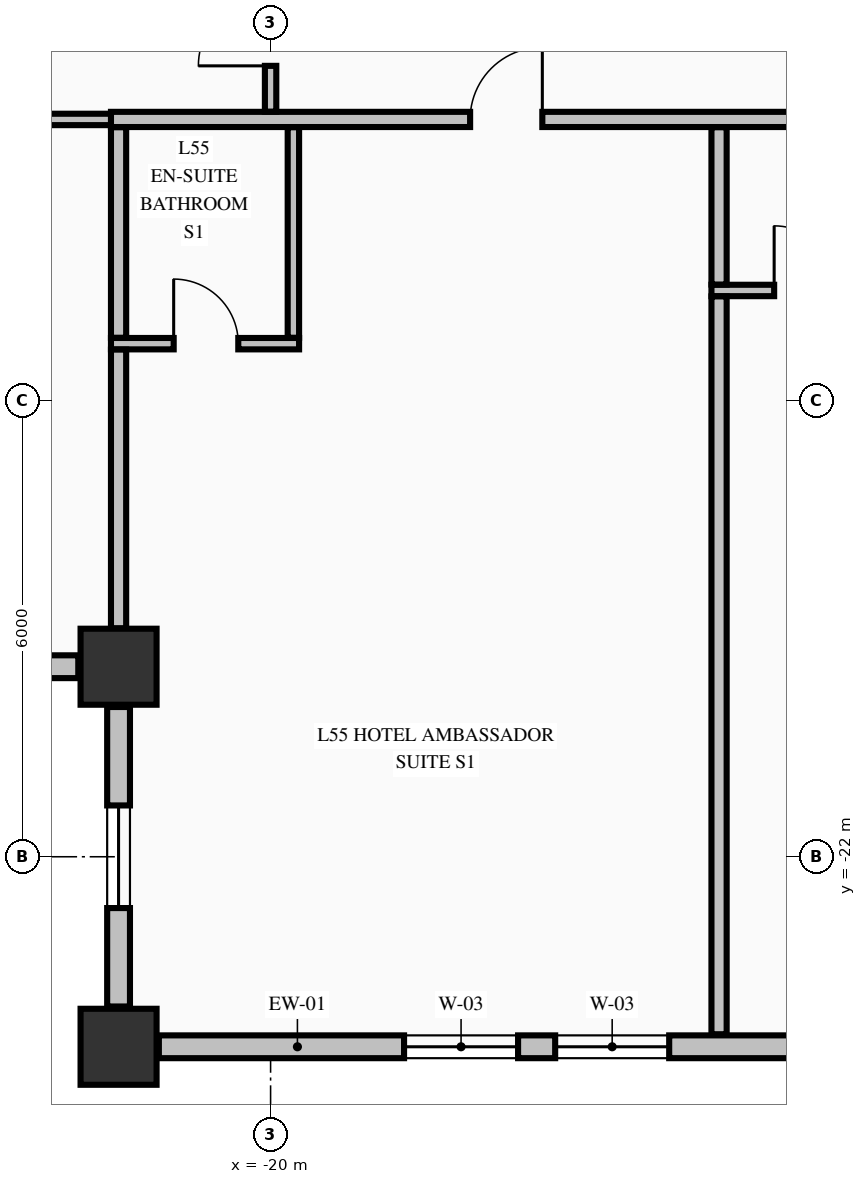
"""IFC4 building model, lengths in metres.
Left out: names, types, materials, properties, quantities, classifications, styles, units other than length and angle.
Written with IfcOpenShell. Run it as: python <this file> out.ifc"""

import sys

from ifc_helpers import new_model, si_unit, direction, frame, frame_2d, origin, origin_2d, place, context, subcontext, project, spatial, rectangle, extrude, element, fill, save


model = new_model("IFC4")
c1 = context("Model", 3, precision=1e-05, world=origin(), true_north=direction((0.0, 1.0)))
c2 = subcontext(c1, "Body", "Model", "MODEL_VIEW")
j1 = project(units=[si_unit("LENGTHUNIT", "METRE"), si_unit("PLANEANGLEUNIT", "RADIAN")], contexts=[c1])
p1 = place(None, origin())
s1 = spatial("IfcSite", under=j1, at=p1, CompositionType="ELEMENT")
p2 = place(p1, origin())
s2 = spatial("IfcBuilding", under=s1, at=p2, CompositionType="ELEMENT")
p3 = place(p2, frame((0.0, 0.0, 211.86)))
s3 = spatial("IfcBuildingStorey", under=s2, at=p3, CompositionType="ELEMENT", Elevation=211.86)
for number, where, z_axis, x_axis in (
    (1, (-22.0, -24.5, -0.325), (0.0, 0.0, 1.0), (1.0, 0.0, 0.0)),
    (2, (-22.0, -19.5, -0.325), (0.0, 0.0, 1.0), (1.0, 0.0, 0.0)),
):
    element("IfcColumn", number, at=place(p3, frame(where, z_axis=z_axis, x_axis=x_axis)), inside=s3, PredefinedType="COLUMN", context=c2, shape_type="SweptSolid", body=[
        extrude(rectangle(XDim=1.0, YDim=1.0, at=origin_2d()), origin(), (0.0, 0.0, 1.0), 3.475),
    ])
p4 = place(p3, frame((-26.47, -19.5, 0.0), z_axis=(0.0, 0.0, 1.0), x_axis=(1.0, 0.0, 0.0)))
e3 = element("IfcWall", 3, at=p4, inside=s3, PredefinedType="STANDARD", context=c2, shape_type="SweptSolid", body=[
    extrude(rectangle(XDim=3.94, YDim=0.3, at=frame_2d((1.97, 0.0))), origin(), (0.0, 0.0, 1.0), 2.542),
])
p5 = place(p4, frame((1.295, 0.0, 0.68)))
e4 = element("IfcOpeningElement", 4, at=p5, cuts=e3, PredefinedType="OPENING", context=c2, shape_type="SweptSolid", body=[
    extrude(rectangle(XDim=1.35, YDim=1.42, at=frame_2d((0.675, 0.71))), frame((0.0, 0.16, 0.0), z_axis=(0.0, -1.0, 0.0), x_axis=(1.0, 0.0, 0.0)), (0.0, 0.0, 1.0), 0.32),
])
p6 = place(p3, frame((-22.0, -20.03, 0.0), z_axis=(0.0, 0.0, 1.0), x_axis=(0.0, -1.0, 0.0)))
e5 = element("IfcWall", 5, at=p6, inside=s3, PredefinedType="STANDARD", context=c2, shape_type="SweptSolid", body=[
    extrude(rectangle(XDim=3.94, YDim=0.3, at=frame_2d((1.97, 0.0))), origin(), (0.0, 0.0, 1.0), 2.542),
])
p7 = place(p6, frame((1.295, 0.0, 0.68)))
e6 = element("IfcOpeningElement", 6, at=p7, cuts=e5, PredefinedType="OPENING", context=c2, shape_type="SweptSolid", body=[
    extrude(rectangle(XDim=1.35, YDim=1.42, at=frame_2d((0.675, 0.71))), frame((0.0, 0.16, 0.0), z_axis=(0.0, -1.0, 0.0), x_axis=(1.0, 0.0, 0.0)), (0.0, 0.0, 1.0), 0.32),
])
p8 = place(p3, frame((-21.47, -24.5, 0.0), z_axis=(0.0, 0.0, 1.0), x_axis=(1.0, 0.0, 0.0)))
e7 = element("IfcWall", 7, at=p8, inside=s3, PredefinedType="STANDARD", context=c2, shape_type="SweptSolid", body=[
    extrude(rectangle(XDim=9.94, YDim=0.3, at=frame_2d((4.97, 0.0))), origin(), (0.0, 0.0, 1.0), 2.542),
])
p9 = place(p8, frame((3.226, 0.0, 0.72)))
e8 = element("IfcOpeningElement", 8, at=p9, cuts=e7, PredefinedType="OPENING", context=c2, shape_type="SweptSolid", body=[
    extrude(rectangle(XDim=1.5, YDim=1.6, at=frame_2d((0.75, 0.8))), frame((0.0, 0.16, 0.0), z_axis=(0.0, -1.0, 0.0), x_axis=(1.0, 0.0, 0.0)), (0.0, 0.0, 1.0), 0.32),
])
p10 = place(p8, frame((5.214, 0.0, 0.72)))
e9 = element("IfcOpeningElement", 9, at=p10, cuts=e7, PredefinedType="OPENING", context=c2, shape_type="SweptSolid", body=[
    extrude(rectangle(XDim=1.5, YDim=1.6, at=frame_2d((0.75, 0.8))), frame((0.0, 0.16, 0.0), z_axis=(0.0, -1.0, 0.0), x_axis=(1.0, 0.0, 0.0)), (0.0, 0.0, 1.0), 0.32),
])
p11 = place(p3, frame((-22.1, -15.25, 0.0), z_axis=(0.0, 0.0, 1.0), x_axis=(1.0, 0.0, 0.0)))
e10 = element("IfcWall", 10, at=p11, inside=s3, PredefinedType="PARTITIONING", context=c2, shape_type="SweptSolid", body=[
    extrude(rectangle(XDim=2.475, YDim=0.15, at=frame_2d((1.238, 0.0))), origin(), (0.0, 0.0, 1.0), 3.15),
])
p12 = place(p11, frame((0.825, 0.0, 0.0)))
e11 = element("IfcOpeningElement", 11, at=p12, cuts=e10, PredefinedType="OPENING", context=c2, shape_type="SweptSolid", body=[
    extrude(rectangle(XDim=0.85, YDim=2.1, at=frame_2d((0.425, 1.05))), frame((0.0, 0.085, 0.0), z_axis=(0.0, -1.0, 0.0), x_axis=(1.0, 0.0, 0.0)), (0.0, 0.0, 1.0), 0.17),
])
p13 = place(p3, frame((-14.2, -14.55, 0.0), z_axis=(0.0, 0.0, 1.0), x_axis=(1.0, 0.0, 0.0)))
e12 = element("IfcWall", 12, at=p13, inside=s3, PredefinedType="PARTITIONING", context=c2, shape_type="SweptSolid", body=[
    extrude(rectangle(XDim=2.475, YDim=0.15, at=frame_2d((1.237, 0.0))), origin(), (0.0, 0.0, 1.0), 3.15),
])
p14 = place(p13, frame((0.825, 0.0, 0.0)))
e13 = element("IfcOpeningElement", 13, at=p14, cuts=e12, PredefinedType="OPENING", context=c2, shape_type="SweptSolid", body=[
    extrude(rectangle(XDim=0.85, YDim=2.1, at=frame_2d((0.425, 1.05))), frame((0.0, 0.085, 0.0), z_axis=(0.0, -1.0, 0.0), x_axis=(1.0, 0.0, 0.0)), (0.0, 0.0, 1.0), 0.17),
])
p15 = place(p3, frame((-26.835, -12.3, 0.0), z_axis=(0.0, 0.0, 1.0), x_axis=(1.0, 0.0, 0.0)))
e14 = element("IfcWall", 14, at=p15, inside=s3, PredefinedType="PARTITIONING", context=c2, shape_type="SweptSolid", body=[
    extrude(rectangle(XDim=4.935, YDim=0.15, at=frame_2d((2.468, 0.0))), origin(), (0.0, 0.0, 1.0), 3.15),
])
p16 = place(p3, frame((-22.1, -12.3, 0.0), z_axis=(0.0, 0.0, 1.0), x_axis=(1.0, 0.0, 0.0)))
e15 = element("IfcWall", 15, at=p16, inside=s3, PredefinedType="PARTITIONING", context=c2, shape_type="SweptSolid", body=[
    extrude(rectangle(XDim=39.2, YDim=0.2, at=frame_2d((19.6, 0.0))), origin(), (0.0, 0.0, 1.0), 3.15),
])
p17 = place(p16, frame((4.725, 0.0, 0.0)))
e16 = element("IfcOpeningElement", 16, at=p17, cuts=e15, PredefinedType="OPENING", context=c2, shape_type="SweptSolid", body=[
    extrude(rectangle(XDim=0.95, YDim=2.15, at=frame_2d((0.475, 1.075))), frame((0.0, 0.11, 0.0), z_axis=(0.0, -1.0, 0.0), x_axis=(1.0, 0.0, 0.0)), (0.0, 0.0, 1.0), 0.22),
])
p18 = place(p16, frame((12.625, 0.0, 0.0)))
e17 = element("IfcOpeningElement", 17, at=p18, cuts=e15, PredefinedType="OPENING", context=c2, shape_type="SweptSolid", body=[
    extrude(rectangle(XDim=0.95, YDim=2.15, at=frame_2d((0.475, 1.075))), frame((0.0, 0.11, 0.0), z_axis=(0.0, -1.0, 0.0), x_axis=(1.0, 0.0, 0.0)), (0.0, 0.0, 1.0), 0.22),
])
p19 = place(p16, frame((19.375, 0.0, 0.0)))
e18 = element("IfcOpeningElement", 18, at=p19, cuts=e15, PredefinedType="OPENING", context=c2, shape_type="SweptSolid", body=[
    extrude(rectangle(XDim=0.95, YDim=2.15, at=frame_2d((0.475, 1.075))), frame((0.0, 0.11, 0.0), z_axis=(0.0, -1.0, 0.0), x_axis=(1.0, 0.0, 0.0)), (0.0, 0.0, 1.0), 0.22),
])
p20 = place(p16, frame((30.375, 0.0, 0.0)))
e19 = element("IfcOpeningElement", 19, at=p20, cuts=e15, PredefinedType="OPENING", context=c2, shape_type="SweptSolid", body=[
    extrude(rectangle(XDim=0.95, YDim=2.15, at=frame_2d((0.475, 1.075))), frame((0.0, 0.11, 0.0), z_axis=(0.0, -1.0, 0.0), x_axis=(1.0, 0.0, 0.0)), (0.0, 0.0, 1.0), 0.22),
])
p21 = place(p3, frame((-22.0, -18.994, 0.0), z_axis=(0.0, 0.0, 1.0), x_axis=(0.0, 1.0, 0.0)))
e20 = element("IfcWall", 20, at=p21, inside=s3, PredefinedType="PARTITIONING", context=c2, shape_type="SweptSolid", body=[
    extrude(rectangle(XDim=3.666, YDim=0.2, at=frame_2d((1.833, 0.0))), origin(), (0.0, 0.0, 1.0), 3.15),
])
p22 = place(p3, frame((-22.0, -15.172, 0.0), z_axis=(0.0, 0.0, 1.0), x_axis=(0.0, 1.0, 0.0)))
e21 = element("IfcWall", 21, at=p22, inside=s3, PredefinedType="PARTITIONING", context=c2, shape_type="SweptSolid", body=[
    extrude(rectangle(XDim=2.769, YDim=0.2, at=frame_2d((1.385, 0.0))), origin(), (0.0, 0.0, 1.0), 3.15),
])
p23 = place(p3, frame((-20.0, -12.197, 0.0), z_axis=(0.0, 0.0, 1.0), x_axis=(0.0, 1.0, 0.0)))
e22 = element("IfcWall", 22, at=p23, inside=s3, PredefinedType="PARTITIONING", context=c2, shape_type="SweptSolid", body=[
    extrude(rectangle(XDim=1.816, YDim=0.15, at=frame_2d((0.908, 0.0))), origin(), (0.0, 0.0, 1.0), 2.342),
])
p24 = place(p23, frame((0.602, 0.0, 0.0)))
e23 = element("IfcOpeningElement", 23, at=p24, cuts=e22, PredefinedType="OPENING", context=c2, shape_type="SweptSolid", body=[
    extrude(rectangle(XDim=0.95, YDim=2.15, at=frame_2d((0.475, 1.075))), frame((0.0, 0.085, 0.0), z_axis=(0.0, -1.0, 0.0), x_axis=(1.0, 0.0, 0.0)), (0.0, 0.0, 1.0), 0.17),
])
p25 = place(p3, frame((-19.7, -15.172, 0.0), z_axis=(0.0, 0.0, 1.0), x_axis=(0.0, 1.0, 0.0)))
e24 = element("IfcWall", 24, at=p25, inside=s3, PredefinedType="PARTITIONING", context=c2, shape_type="SweptSolid", body=[
    extrude(rectangle(XDim=2.769, YDim=0.15, at=frame_2d((1.385, 0.0))), origin(), (0.0, 0.0, 1.0), 2.342),
])
p26 = place(p3, frame((-14.1, -24.335, 0.0), z_axis=(0.0, 0.0, 1.0), x_axis=(0.0, 1.0, 0.0)))
e25 = element("IfcWall", 25, at=p26, inside=s3, PredefinedType="PARTITIONING", context=c2, shape_type="SweptSolid", body=[
    extrude(rectangle(XDim=9.707, YDim=0.2, at=frame_2d((4.854, 0.0))), origin(), (0.0, 0.0, 1.0), 3.15),
])
p27 = place(p3, frame((-14.1, -14.472, 0.0), z_axis=(0.0, 0.0, 1.0), x_axis=(0.0, 1.0, 0.0)))
e26 = element("IfcWall", 26, at=p27, inside=s3, PredefinedType="PARTITIONING", context=c2, shape_type="SweptSolid", body=[
    extrude(rectangle(XDim=2.069, YDim=0.2, at=frame_2d((1.034, 0.0))), origin(), (0.0, 0.0, 1.0), 3.15),
])
p28 = place(p7, origin())
e27 = element("IfcWindow", 27, at=p28, inside=s3, PartitioningType="SINGLE_PANEL", PredefinedType="WINDOW", context=c2, shape_type="SweptSolid", body=[
    extrude(rectangle(XDim=1.35, YDim=1.42, at=frame_2d((0.675, 0.71))), frame((0.0, 0.03, 0.0), z_axis=(0.0, -1.0, 0.0), x_axis=(1.0, 0.0, 0.0)), (0.0, 0.0, 1.0), 0.06),
])
fill(e6, e27)
p29 = place(p9, origin())
e28 = element("IfcWindow", 28, at=p29, inside=s3, PartitioningType="SINGLE_PANEL", PredefinedType="WINDOW", context=c2, shape_type="SweptSolid", body=[
    extrude(rectangle(XDim=1.5, YDim=1.6, at=frame_2d((0.75, 0.8))), frame((0.0, 0.03, 0.0), z_axis=(0.0, -1.0, 0.0), x_axis=(1.0, 0.0, 0.0)), (0.0, 0.0, 1.0), 0.06),
])
fill(e8, e28)
p30 = place(p10, origin())
e29 = element("IfcWindow", 29, at=p30, inside=s3, PartitioningType="SINGLE_PANEL", PredefinedType="WINDOW", context=c2, shape_type="SweptSolid", body=[
    extrude(rectangle(XDim=1.5, YDim=1.6, at=frame_2d((0.75, 0.8))), frame((0.0, 0.03, 0.0), z_axis=(0.0, -1.0, 0.0), x_axis=(1.0, 0.0, 0.0)), (0.0, 0.0, 1.0), 0.06),
])
fill(e9, e29)
p31 = place(p17, origin())
e30 = element("IfcDoor", 30, at=p31, inside=s3, OperationType="SINGLE_SWING_RIGHT", PredefinedType="DOOR", context=c2, shape_type="SweptSolid", body=[
    extrude(rectangle(XDim=0.95, YDim=2.15, at=frame_2d((0.475, 1.075))), frame((0.0, 0.025, 0.0), z_axis=(0.0, -1.0, 0.0), x_axis=(1.0, 0.0, 0.0)), (0.0, 0.0, 1.0), 0.05),
])
fill(e16, e30)
p32 = place(p12, origin())
e31 = element("IfcDoor", 31, at=p32, inside=s3, OperationType="SINGLE_SWING_LEFT", PredefinedType="DOOR", context=c2, shape_type="SweptSolid", body=[
    extrude(rectangle(XDim=0.85, YDim=2.1, at=frame_2d((0.425, 1.05))), frame((0.0, 0.025, 0.0), z_axis=(0.0, -1.0, 0.0), x_axis=(1.0, 0.0, 0.0)), (0.0, 0.0, 1.0), 0.05),
])
fill(e11, e31)
p33 = place(p14, origin())
e32 = element("IfcDoor", 32, at=p33, inside=s3, OperationType="SINGLE_SWING_LEFT", PredefinedType="DOOR", context=c2, shape_type="SweptSolid", body=[
    extrude(rectangle(XDim=0.85, YDim=2.1, at=frame_2d((0.425, 1.05))), frame((0.0, 0.025, 0.0), z_axis=(0.0, -1.0, 0.0), x_axis=(1.0, 0.0, 0.0)), (0.0, 0.0, 1.0), 0.05),
])
fill(e13, e32)
p34 = place(p24, origin())
e33 = element("IfcDoor", 33, at=p34, inside=s3, OperationType="SINGLE_SWING_LEFT", PredefinedType="DOOR", context=c2, shape_type="SweptSolid", body=[
    extrude(rectangle(XDim=0.95, YDim=2.15, at=frame_2d((0.475, 1.075))), frame((0.0, 0.025, 0.0), z_axis=(0.0, -1.0, 0.0), x_axis=(1.0, 0.0, 0.0)), (0.0, 0.0, 1.0), 0.05),
])
fill(e23, e33)
save(model, sys.argv[1])
